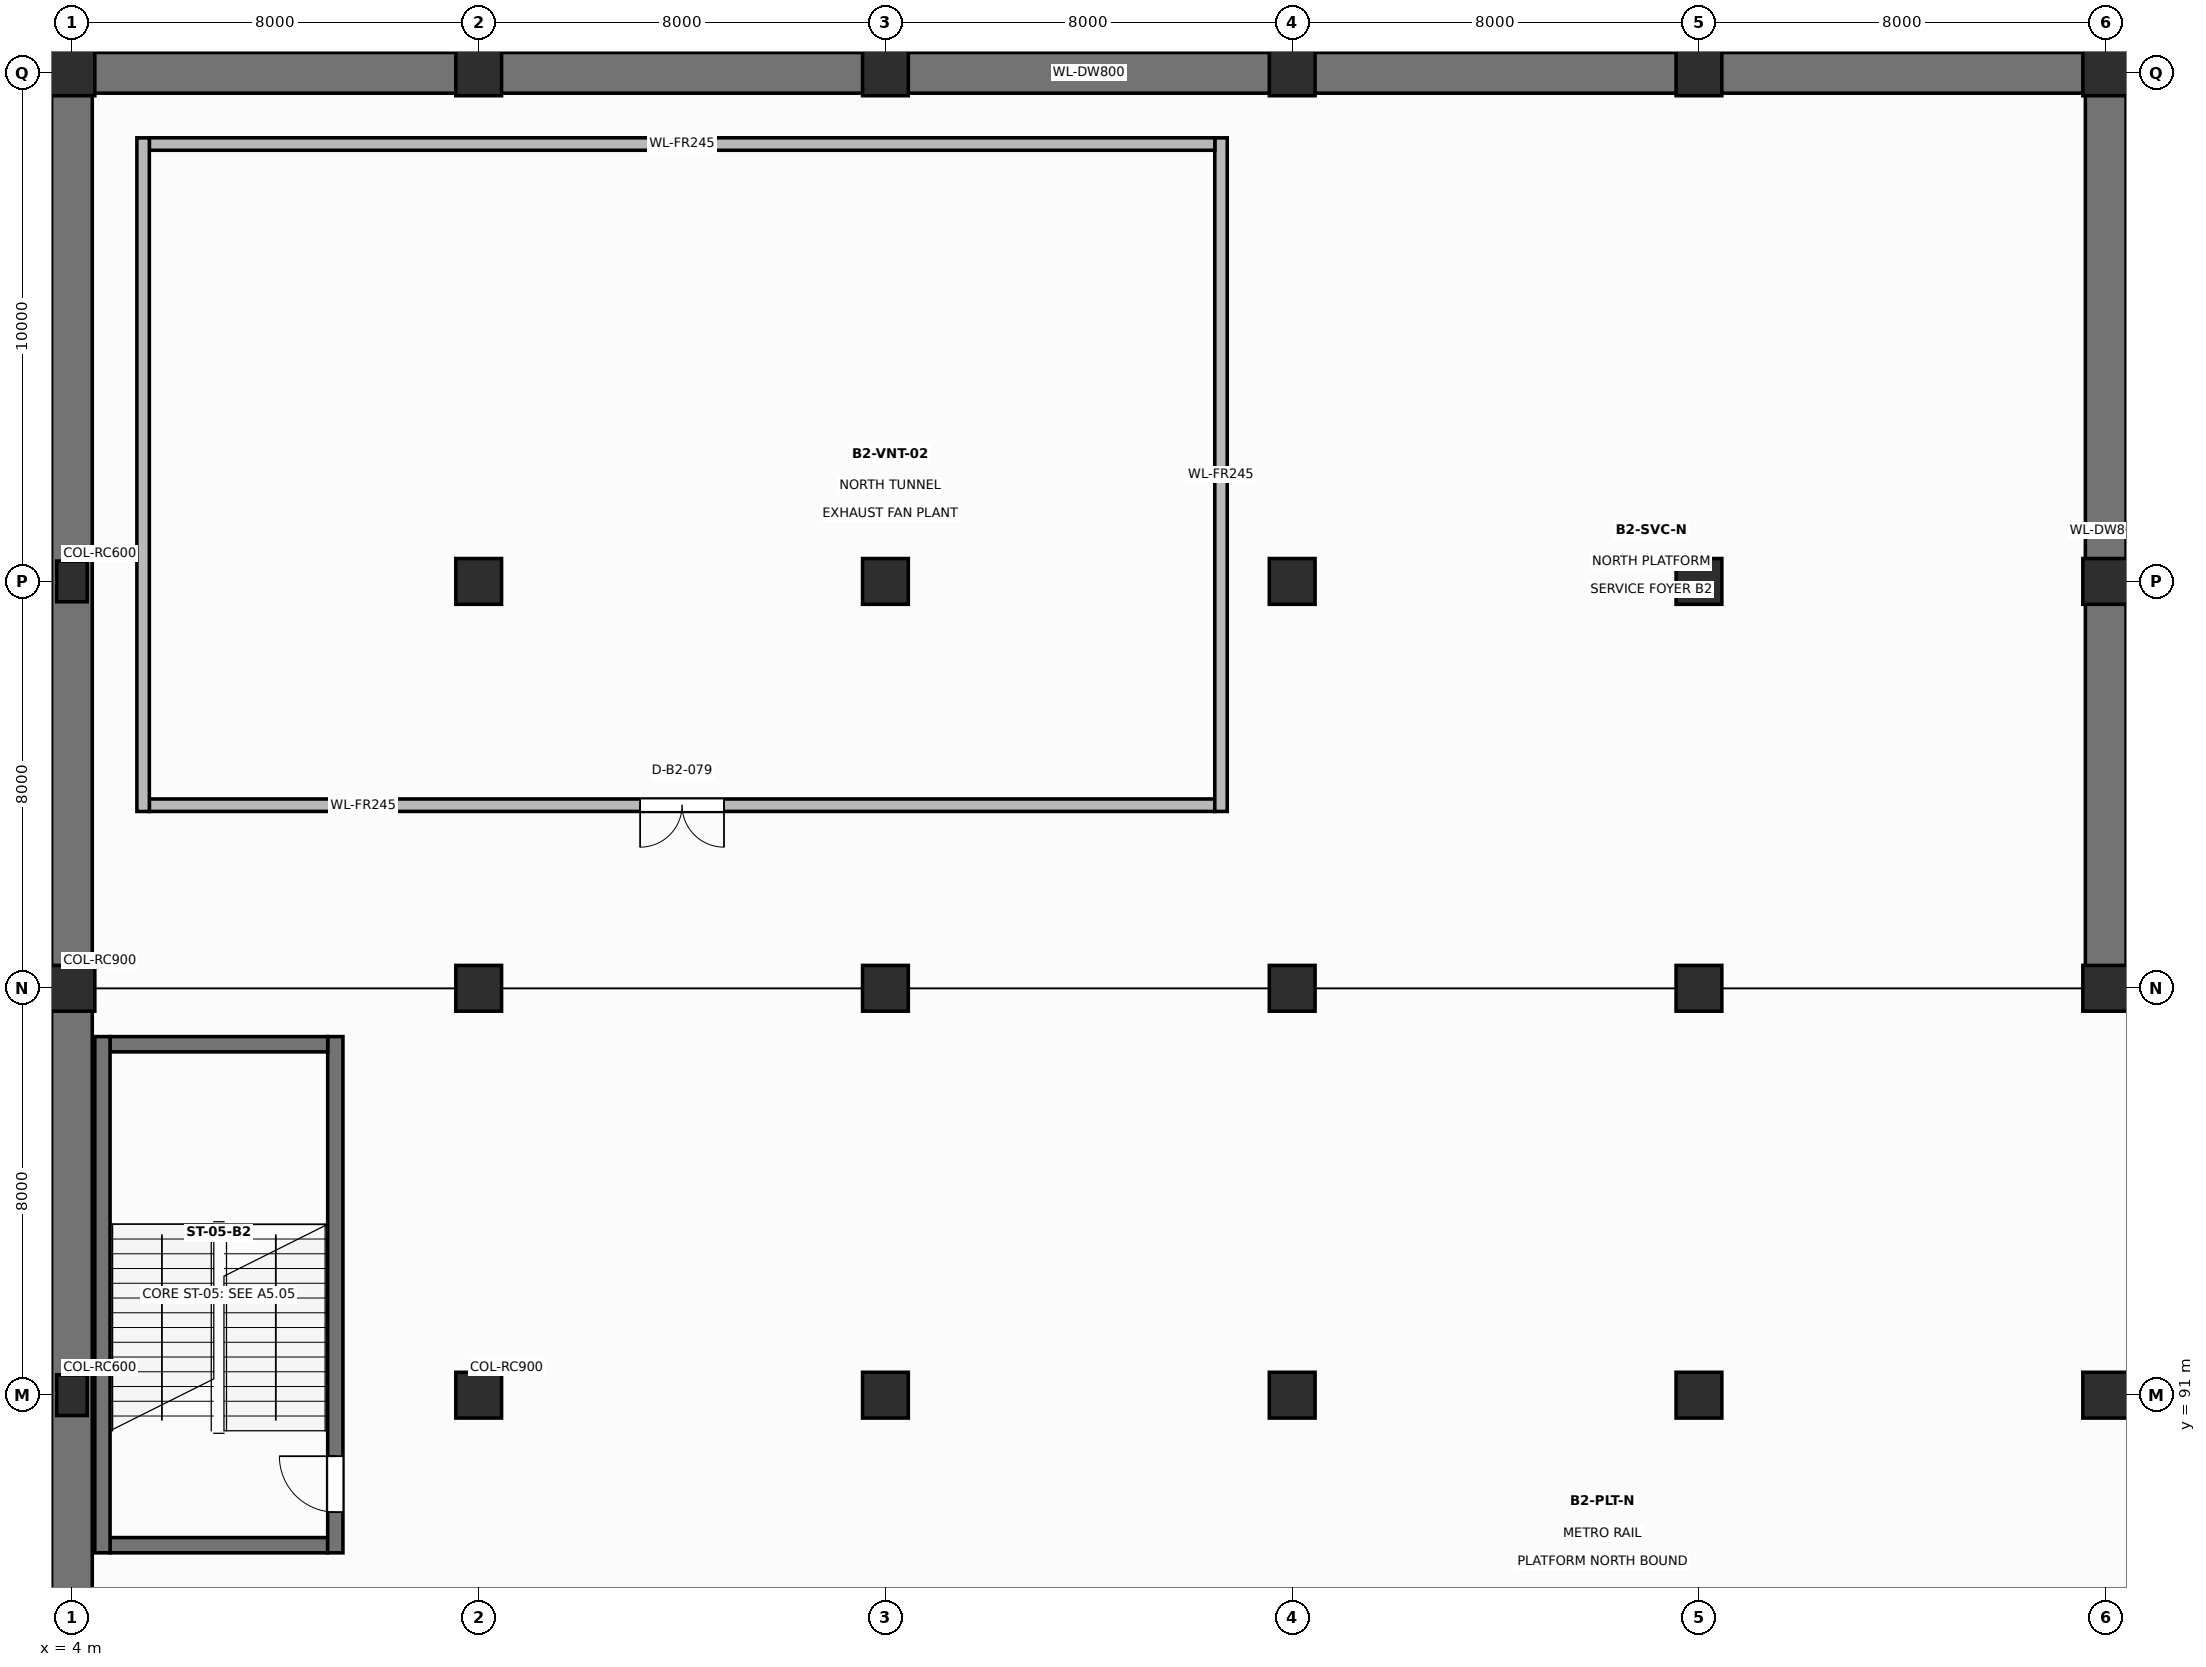
"""IFC4 building model, lengths in metres.
Left out: names, types, materials, properties, quantities, classifications, styles, units other than length and angle.
Written with IfcOpenShell. Run it as: python <this file> out.ifc"""

import sys

from ifc_helpers import new_model, si_unit, direction, frame, frame_2d, origin, origin_2d, place, context, subcontext, project, spatial, rectangle, extrude, element, fill, save


model = new_model("IFC4")
c1 = context("Model", 3, precision=1e-05, world=origin(), true_north=direction((0.0, 1.0)))
c2 = subcontext(c1, "Body", "Model", "MODEL_VIEW")
j1 = project(units=[si_unit("LENGTHUNIT", "METRE"), si_unit("PLANEANGLEUNIT", "RADIAN")], contexts=[c1])
p1 = place(None, origin())
s1 = spatial("IfcSite", under=j1, at=p1, CompositionType="ELEMENT")
p2 = place(p1, origin())
s2 = spatial("IfcBuilding", under=s1, at=p2, CompositionType="ELEMENT")
p3 = place(p2, frame((0.0, 0.0, -11.2)))
s3 = spatial("IfcBuildingStorey", under=s2, at=p3, CompositionType="ELEMENT", Elevation=-11.2)
p4 = place(p3, frame((44.0, 98.6, 0.0), z_axis=(0.0, 0.0, 1.0), x_axis=(0.0, 1.0, 0.0)))
e1 = element("IfcWall", 1, at=p4, inside=s3, PredefinedType="SOLIDWALL", context=c2, shape_type="SweptSolid", body=[
    extrude(rectangle(XDim=18.8, YDim=0.8, at=frame_2d((9.4, 0.0))), origin(), (0.0, 0.0, 1.0), 5.22),
])
p5 = place(p3, frame((4.4, 117.0, 0.0), z_axis=(0.0, 0.0, 1.0), x_axis=(1.0, 0.0, 0.0)))
e2 = element("IfcWall", 2, at=p5, inside=s3, PredefinedType="SOLIDWALL", context=c2, shape_type="SweptSolid", body=[
    extrude(rectangle(XDim=39.2, YDim=0.8, at=frame_2d((19.6, 0.0))), origin(), (0.0, 0.0, 1.0), 5.22),
])
p6 = place(p3, frame((4.0, 2.6, 0.0), z_axis=(0.0, 0.0, 1.0), x_axis=(0.0, 1.0, 0.0)))
e3 = element("IfcWall", 3, at=p6, inside=s3, PredefinedType="SOLIDWALL", context=c2, shape_type="SweptSolid", body=[
    extrude(rectangle(XDim=114.8, YDim=0.8, at=frame_2d((57.4, 0.0))), origin(), (0.0, 0.0, 1.0), 5.22),
])
p7 = place(p3, frame((4.0, 91.0, 0.0), z_axis=(0.0, 0.0, 1.0), x_axis=(1.0, 0.0, 0.0)))
e4 = element("IfcColumn", 4, at=p7, inside=s3, PredefinedType="PILASTER", context=c2, shape_type="SweptSolid", body=[
    extrude(rectangle(XDim=0.6, YDim=0.8, at=origin_2d()), origin(), (0.0, 0.0, 1.0), 5.6),
])
p8 = place(p3, frame((4.0, 99.0, 0.0), z_axis=(0.0, 0.0, 1.0), x_axis=(1.0, 0.0, 0.0)))
e5 = element("IfcColumn", 5, at=p8, inside=s3, PredefinedType="COLUMN", context=c2, shape_type="SweptSolid", body=[
    extrude(rectangle(XDim=0.9, YDim=0.9, at=origin_2d()), origin(), (0.0, 0.0, 1.0), 5.6),
])
p9 = place(p3, frame((4.0, 107.0, 0.0), z_axis=(0.0, 0.0, 1.0), x_axis=(1.0, 0.0, 0.0)))
e6 = element("IfcColumn", 6, at=p9, inside=s3, PredefinedType="PILASTER", context=c2, shape_type="SweptSolid", body=[
    extrude(rectangle(XDim=0.6, YDim=0.8, at=origin_2d()), origin(), (0.0, 0.0, 1.0), 5.6),
])
for number, where, z_axis, x_axis in (
    (7, (4.0, 117.0, 0.0), (0.0, 0.0, 1.0), (1.0, 0.0, 0.0)),
    (8, (12.0, 91.0, 0.0), (0.0, 0.0, 1.0), (1.0, 0.0, 0.0)),
    (9, (12.0, 99.0, 0.0), (0.0, 0.0, 1.0), (1.0, 0.0, 0.0)),
    (10, (12.0, 107.0, 0.0), (0.0, 0.0, 1.0), (1.0, 0.0, 0.0)),
    (11, (12.0, 117.0, 0.0), (0.0, 0.0, 1.0), (1.0, 0.0, 0.0)),
    (12, (20.0, 91.0, 0.0), (0.0, 0.0, 1.0), (1.0, 0.0, 0.0)),
    (13, (20.0, 99.0, 0.0), (0.0, 0.0, 1.0), (1.0, 0.0, 0.0)),
    (14, (20.0, 107.0, 0.0), (0.0, 0.0, 1.0), (1.0, 0.0, 0.0)),
    (15, (20.0, 117.0, 0.0), (0.0, 0.0, 1.0), (1.0, 0.0, 0.0)),
    (16, (28.0, 91.0, 0.0), (0.0, 0.0, 1.0), (1.0, 0.0, 0.0)),
    (17, (28.0, 99.0, 0.0), (0.0, 0.0, 1.0), (1.0, 0.0, 0.0)),
    (18, (28.0, 107.0, 0.0), (0.0, 0.0, 1.0), (1.0, 0.0, 0.0)),
    (19, (28.0, 117.0, 0.0), (0.0, 0.0, 1.0), (1.0, 0.0, 0.0)),
    (20, (36.0, 91.0, 0.0), (0.0, 0.0, 1.0), (1.0, 0.0, 0.0)),
    (21, (36.0, 99.0, 0.0), (0.0, 0.0, 1.0), (1.0, 0.0, 0.0)),
    (22, (36.0, 107.0, 0.0), (0.0, 0.0, 1.0), (1.0, 0.0, 0.0)),
    (23, (36.0, 117.0, 0.0), (0.0, 0.0, 1.0), (1.0, 0.0, 0.0)),
    (24, (44.0, 91.0, 0.0), (0.0, 0.0, 1.0), (1.0, 0.0, 0.0)),
    (25, (44.0, 99.0, 0.0), (0.0, 0.0, 1.0), (1.0, 0.0, 0.0)),
    (26, (44.0, 107.0, 0.0), (0.0, 0.0, 1.0), (1.0, 0.0, 0.0)),
    (27, (44.0, 117.0, 0.0), (0.0, 0.0, 1.0), (1.0, 0.0, 0.0)),
):
    element("IfcColumn", number, at=place(p3, frame(where, z_axis=z_axis, x_axis=x_axis)), inside=s3, PredefinedType="COLUMN", context=c2, shape_type="SweptSolid", body=[
        extrude(rectangle(XDim=0.9, YDim=0.9, at=origin_2d()), origin(), (0.0, 0.0, 1.0), 5.6),
    ])
p10 = place(p3, frame((4.75, 88.05, 0.0), z_axis=(0.0, 0.0, 1.0), x_axis=(1.0, 0.0, 0.0)))
e28 = element("IfcWall", 28, at=p10, inside=s3, PredefinedType="SHEAR", context=c2, shape_type="SweptSolid", body=[
    extrude(rectangle(XDim=4.28, YDim=0.3, at=frame_2d((2.14, 0.0))), origin(), (0.0, 0.0, 1.0), 5.235),
])
p11 = place(p3, frame((9.18, 87.9, 0.0), z_axis=(0.0, 0.0, 1.0), x_axis=(0.0, 1.0, 0.0)))
e29 = element("IfcWall", 29, at=p11, inside=s3, PredefinedType="SHEAR", context=c2, shape_type="SweptSolid", body=[
    extrude(rectangle(XDim=10.15, YDim=0.3, at=frame_2d((5.075, 0.0))), origin(), (0.0, 0.0, 1.0), 5.235),
])
p12 = place(p11, frame((0.8, 0.0, 0.0)))
e30 = element("IfcOpeningElement", 30, at=p12, cuts=e29, PredefinedType="OPENING", context=c2, shape_type="SweptSolid", body=[
    extrude(rectangle(XDim=1.1, YDim=2.15, at=frame_2d((0.55, 1.075))), frame((0.0, 0.16, 0.0), z_axis=(0.0, -1.0, 0.0), x_axis=(1.0, 0.0, 0.0)), (0.0, 0.0, 1.0), 0.32),
])
p13 = place(p3, frame((9.03, 97.9, 0.0), z_axis=(0.0, 0.0, 1.0), x_axis=(-1.0, 0.0, 0.0)))
e31 = element("IfcWall", 31, at=p13, inside=s3, PredefinedType="SHEAR", context=c2, shape_type="SweptSolid", body=[
    extrude(rectangle(XDim=4.28, YDim=0.3, at=frame_2d((2.14, 0.0))), origin(), (0.0, 0.0, 1.0), 5.235),
])
p14 = place(p3, frame((4.6, 98.05, 0.0), z_axis=(0.0, 0.0, 1.0), x_axis=(0.0, -1.0, 0.0)))
e32 = element("IfcWall", 32, at=p14, inside=s3, PredefinedType="SHEAR", context=c2, shape_type="SweptSolid", body=[
    extrude(rectangle(XDim=10.15, YDim=0.3, at=frame_2d((5.075, 0.0))), origin(), (0.0, 0.0, 1.0), 5.235),
])
p15 = place(p3, frame((5.522, 102.6, 0.0), z_axis=(0.0, 0.0, 1.0), x_axis=(1.0, 0.0, 0.0)))
e33 = element("IfcWall", 33, at=p15, inside=s3, PredefinedType="SOLIDWALL", context=c2, shape_type="SweptSolid", body=[
    extrude(rectangle(XDim=20.956, YDim=0.245, at=frame_2d((10.478, 0.0))), origin(), (0.0, 0.0, 1.0), 4.435),
])
p16 = place(p15, frame((9.653, 0.0, 0.0)))
e34 = element("IfcOpeningElement", 34, at=p16, cuts=e33, PredefinedType="OPENING", context=c2, shape_type="SweptSolid", body=[
    extrude(rectangle(XDim=1.65, YDim=2.2, at=frame_2d((0.825, 1.1))), frame((0.0, 0.133, 0.0), z_axis=(0.0, -1.0, 0.0), x_axis=(1.0, 0.0, 0.0)), (0.0, 0.0, 1.0), 0.265),
])
p17 = place(p3, frame((26.6, 102.477, 0.0), z_axis=(0.0, 0.0, 1.0), x_axis=(0.0, 1.0, 0.0)))
e35 = element("IfcWall", 35, at=p17, inside=s3, PredefinedType="SOLIDWALL", context=c2, shape_type="SweptSolid", body=[
    extrude(rectangle(XDim=13.245, YDim=0.245, at=frame_2d((6.623, 0.0))), origin(), (0.0, 0.0, 1.0), 4.435),
])
p18 = place(p3, frame((26.478, 115.6, 0.0), z_axis=(0.0, 0.0, 1.0), x_axis=(-1.0, 0.0, 0.0)))
e36 = element("IfcWall", 36, at=p18, inside=s3, PredefinedType="SOLIDWALL", context=c2, shape_type="SweptSolid", body=[
    extrude(rectangle(XDim=20.956, YDim=0.245, at=frame_2d((10.478, 0.0))), origin(), (0.0, 0.0, 1.0), 4.435),
])
p19 = place(p3, frame((5.4, 115.722, 0.0), z_axis=(0.0, 0.0, 1.0), x_axis=(0.0, -1.0, 0.0)))
e37 = element("IfcWall", 37, at=p19, inside=s3, PredefinedType="SOLIDWALL", context=c2, shape_type="SweptSolid", body=[
    extrude(rectangle(XDim=13.245, YDim=0.245, at=frame_2d((6.623, 0.0))), origin(), (0.0, 0.0, 1.0), 4.435),
])
p20 = place(p12, origin())
e38 = element("IfcDoor", 38, at=p20, inside=s3, OperationType="SINGLE_SWING_RIGHT", PredefinedType="DOOR", context=c2, shape_type="SweptSolid", body=[
    extrude(rectangle(XDim=1.1, YDim=2.15, at=frame_2d((0.55, 1.075))), frame((0.0, 0.025, 0.0), z_axis=(0.0, -1.0, 0.0), x_axis=(1.0, 0.0, 0.0)), (0.0, 0.0, 1.0), 0.05),
])
fill(e30, e38)
p21 = place(p16, frame((1.65, 0.0, 0.0), z_axis=(0.0, 0.0, 1.0), x_axis=(-1.0, 0.0, 0.0)))
e39 = element("IfcDoor", 39, at=p21, inside=s3, OperationType="DOUBLE_DOOR_SINGLE_SWING", PredefinedType="DOOR", context=c2, shape_type="SweptSolid", body=[
    extrude(rectangle(XDim=1.65, YDim=2.2, at=frame_2d((0.825, 1.1))), frame((0.0, 0.025, 0.0), z_axis=(0.0, -1.0, 0.0), x_axis=(1.0, 0.0, 0.0)), (0.0, 0.0, 1.0), 0.05),
])
fill(e34, e39)
save(model, sys.argv[1])
